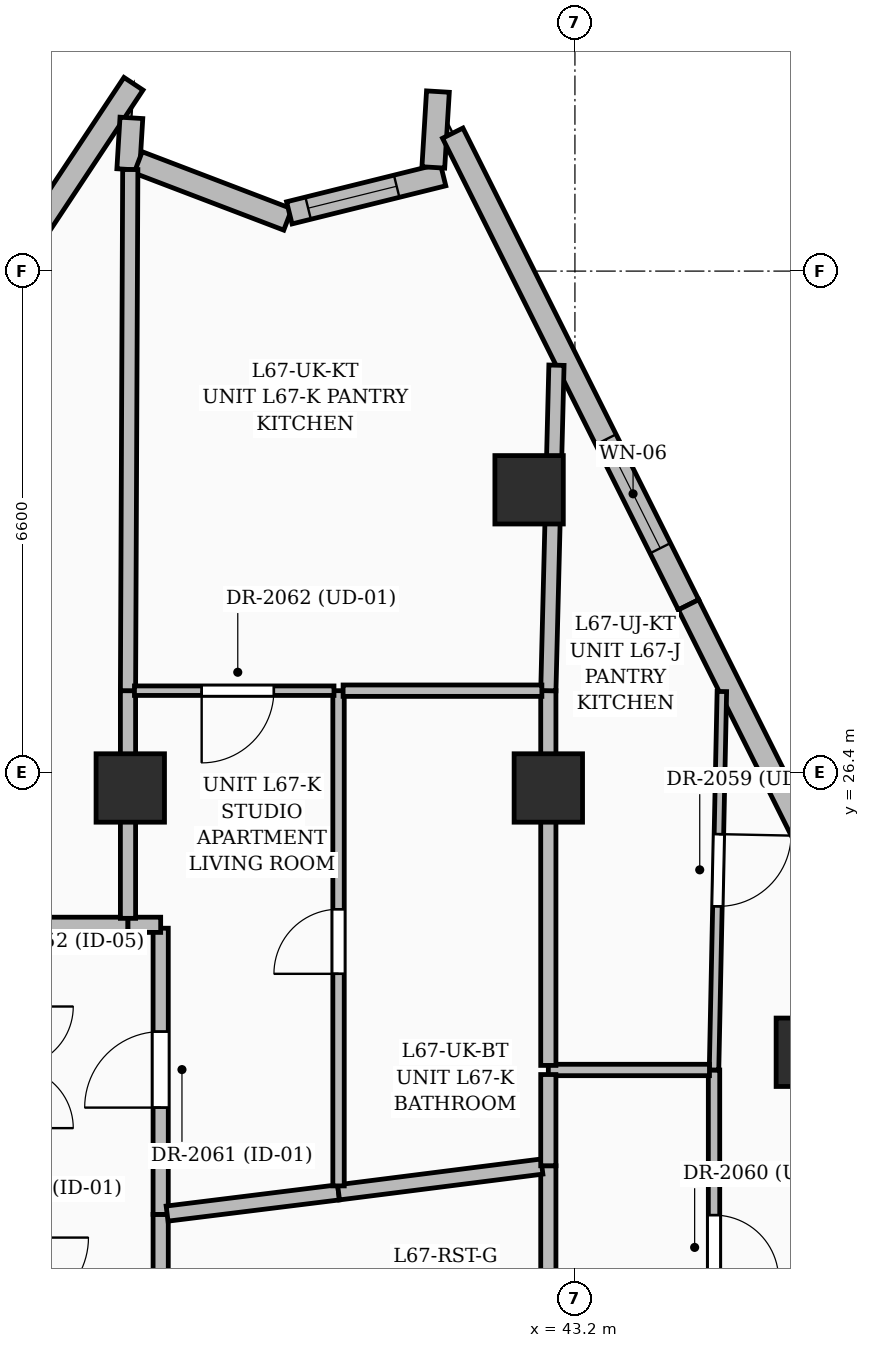
"""IFC4 building model, lengths in metres.
Left out: names, types, materials, properties, quantities, classifications, styles, units other than length and angle.
Written with IfcOpenShell. Run it as: python <this file> out.ifc"""

import sys

from ifc_helpers import new_model, si_unit, direction, frame, frame_2d, origin, origin_2d, place, context, subcontext, project, spatial, rectangle, extrude, element, fill, save


model = new_model("IFC4")
c1 = context("Model", 3, precision=1e-05, world=origin(), true_north=direction((0.0, 1.0)))
c2 = subcontext(c1, "Body", "Model", "MODEL_VIEW")
j1 = project(units=[si_unit("LENGTHUNIT", "METRE"), si_unit("PLANEANGLEUNIT", "RADIAN")], contexts=[c1])
p1 = place(None, origin())
s1 = spatial("IfcSite", under=j1, at=p1, CompositionType="ELEMENT")
p2 = place(p1, origin())
s2 = spatial("IfcBuilding", under=s1, at=p2, CompositionType="ELEMENT")
p3 = place(p2, frame((0.0, 0.0, 259.5)))
s3 = spatial("IfcBuildingStorey", under=s2, at=p3, CompositionType="ELEMENT", Elevation=259.5)
for number, where, z_axis, x_axis in (
    (1, (42.85, 26.2, 0.0), (0.0, 0.0, 1.0), (1.0, 0.0, 0.0)),
    (2, (37.35, 26.2, 0.0), (0.0, 0.0, 1.0), (1.0, 0.0, 0.0)),
    (3, (46.297, 22.723, 0.0), (0.0, 0.0, 1.0), (1.0, 0.0, 0.0)),
    (4, (42.597, 30.123, 0.0), (0.0, 0.0, 1.0), (1.0, 0.0, 0.0)),
):
    element("IfcColumn", number, at=place(p3, frame(where, z_axis=z_axis, x_axis=x_axis)), inside=s3, PredefinedType="COLUMN", context=c2, shape_type="SweptSolid", body=[
        extrude(rectangle(XDim=0.9, YDim=0.9, at=origin_2d()), origin(), (0.0, 0.0, 1.0), 3.75),
    ])
p4 = place(p3, frame((32.896, 28.675, 0.0), z_axis=(0.0, 0.0, 1.0), x_axis=(0.552110297452, 0.83377108336, 0.0)))
e5 = element("IfcWall", 5, at=p4, inside=s3, PredefinedType="SOLIDWALL", context=c2, shape_type="SweptSolid", body=[
    extrude(rectangle(XDim=8.144, YDim=0.3, at=frame_2d((4.072, 0.0))), origin(), (0.0, 0.0, 1.0), 3.5),
])
p5 = place(p4, frame((2.9, 0.0, 0.6)))
e6 = element("IfcOpeningElement", 6, at=p5, cuts=e5, PredefinedType="OPENING", context=c2, shape_type="SweptSolid", body=[
    extrude(rectangle(XDim=1.5, YDim=2.1, at=frame_2d((0.75, 1.05))), frame((0.0, 0.16, 0.0), z_axis=(0.0, -1.0, 0.0), x_axis=(1.0, 0.0, 0.0)), (0.0, 0.0, 1.0), 0.32),
])
p6 = place(p3, frame((37.365, 35.016, 0.0), z_axis=(0.0, 0.0, 1.0), x_axis=(-0.060701101821, -0.998155987929, 0.0)))
e7 = element("IfcWall", 7, at=p6, inside=s3, PredefinedType="SOLIDWALL", context=c2, shape_type="SweptSolid", body=[
    extrude(rectangle(XDim=0.68, YDim=0.3, at=frame_2d((0.34, 0.0))), origin(), (0.0, 0.0, 1.0), 3.5),
])
p7 = place(p3, frame((37.454, 34.431, 0.0), z_axis=(0.0, 0.0, 1.0), x_axis=(0.934285742141, -0.356525107155, 0.0)))
e8 = element("IfcWall", 8, at=p7, inside=s3, PredefinedType="SOLIDWALL", context=c2, shape_type="SweptSolid", body=[
    extrude(rectangle(XDim=2.108, YDim=0.3, at=frame_2d((1.054, 0.0))), origin(), (0.0, 0.0, 1.0), 3.5),
])
p8 = place(p3, frame((39.442, 33.766, 0.0), z_axis=(0.0, 0.0, 1.0), x_axis=(0.970636719037, 0.240550118805, 0.0)))
e9 = element("IfcWall", 9, at=p8, inside=s3, PredefinedType="SOLIDWALL", context=c2, shape_type="SweptSolid", body=[
    extrude(rectangle(XDim=2.084, YDim=0.3, at=frame_2d((1.042, 0.0))), origin(), (0.0, 0.0, 1.0), 3.5),
])
p9 = place(p8, frame((0.255, 0.0, 0.8)))
e10 = element("IfcOpeningElement", 10, at=p9, cuts=e9, PredefinedType="OPENING", context=c2, shape_type="SweptSolid", body=[
    extrude(rectangle(XDim=1.2, YDim=1.8, at=frame_2d((0.6, 0.9))), frame((0.0, 0.16, 0.0), z_axis=(0.0, -1.0, 0.0), x_axis=(1.0, 0.0, 0.0)), (0.0, 0.0, 1.0), 0.32),
])
p10 = place(p3, frame((41.337, 34.364, 0.0), z_axis=(0.0, 0.0, 1.0), x_axis=(0.060554036278, 0.998164920587, 0.0)))
e11 = element("IfcWall", 11, at=p10, inside=s3, PredefinedType="SOLIDWALL", context=c2, shape_type="SweptSolid", body=[
    extrude(rectangle(XDim=1.0, YDim=0.3, at=frame_2d((0.5, 0.0))), origin(), (0.0, 0.0, 1.0), 3.5),
])
p11 = place(p3, frame((41.593, 34.815, 0.0), z_axis=(0.0, 0.0, 1.0), x_axis=(0.447199517072, -0.894434230076, 0.0)))
e12 = element("IfcWall", 12, at=p11, inside=s3, PredefinedType="SOLIDWALL", context=c2, shape_type="SweptSolid", body=[
    extrude(rectangle(XDim=6.937, YDim=0.3, at=frame_2d((3.468, 0.0))), origin(), (0.0, 0.0, 1.0), 3.5),
])
p12 = place(p11, frame((4.505, 0.0, 0.55)))
e13 = element("IfcOpeningElement", 13, at=p12, cuts=e12, PredefinedType="OPENING", context=c2, shape_type="SweptSolid", body=[
    extrude(rectangle(XDim=1.6, YDim=2.2, at=frame_2d((0.8, 1.1))), frame((0.0, 0.16, 0.0), z_axis=(0.0, -1.0, 0.0), x_axis=(1.0, 0.0, 0.0)), (0.0, 0.0, 1.0), 0.32),
])
p13 = place(p3, frame((44.695, 28.611, 0.0), z_axis=(0.0, 0.0, 1.0), x_axis=(0.447161731119, -0.894453121311, 0.0)))
e14 = element("IfcWall", 14, at=p13, inside=s3, PredefinedType="SOLIDWALL", context=c2, shape_type="SweptSolid", body=[
    extrude(rectangle(XDim=7.532, YDim=0.3, at=frame_2d((3.766, 0.0))), origin(), (0.0, 0.0, 1.0), 3.5),
])
p14 = place(p13, frame((3.775, 0.0, 0.6)))
e15 = element("IfcOpeningElement", 15, at=p14, cuts=e14, PredefinedType="OPENING", context=c2, shape_type="SweptSolid", body=[
    extrude(rectangle(XDim=1.5, YDim=2.1, at=frame_2d((0.75, 1.05))), frame((0.0, 0.16, 0.0), z_axis=(0.0, -1.0, 0.0), x_axis=(1.0, 0.0, 0.0)), (0.0, 0.0, 1.0), 0.32),
])
p15 = place(p3, frame((37.75, 17.435, 0.0), z_axis=(0.0, 0.0, 1.0), x_axis=(0.0, 1.0, 0.0)))
e16 = element("IfcWall", 16, at=p15, inside=s3, PredefinedType="PARTITIONING", context=c2, shape_type="SweptSolid", body=[
    extrude(rectangle(XDim=3.155, YDim=0.2, at=frame_2d((1.578, 0.0))), origin(), (0.0, 0.0, 1.0), 3.5),
])
p16 = place(p3, frame((37.32, 24.4, 0.0), z_axis=(0.0, 0.0, 1.0), x_axis=(-1.0, 0.0, 0.0)))
e17 = element("IfcWall", 17, at=p16, inside=s3, PredefinedType="PARTITIONING", context=c2, shape_type="SweptSolid", body=[
    extrude(rectangle(XDim=1.52, YDim=0.2, at=frame_2d((0.76, 0.0))), origin(), (0.0, 0.0, 1.0), 2.685),
])
p17 = place(p3, frame((37.75, 20.59, 0.0), z_axis=(0.0, 0.0, 1.0), x_axis=(0.0, 1.0, 0.0)))
e18 = element("IfcWall", 18, at=p17, inside=s3, PredefinedType="PARTITIONING", context=c2, shape_type="SweptSolid", body=[
    extrude(rectangle(XDim=3.765, YDim=0.2, at=frame_2d((1.882, 0.0))), origin(), (0.0, 0.0, 1.0), 3.5),
])
p18 = place(p17, frame((1.405, 0.0, 0.0)))
e19 = element("IfcOpeningElement", 19, at=p18, cuts=e18, PredefinedType="OPENING", context=c2, shape_type="SweptSolid", body=[
    extrude(rectangle(XDim=1.0, YDim=2.2, at=frame_2d((0.5, 1.1))), frame((0.0, 0.11, 0.0), z_axis=(0.0, -1.0, 0.0), x_axis=(1.0, 0.0, 0.0)), (0.0, 0.0, 1.0), 0.22),
])
p19 = place(p3, frame((37.75, 24.4, 0.0), z_axis=(0.0, 0.0, 1.0), x_axis=(-1.0, 0.0, 0.0)))
e20 = element("IfcWall", 20, at=p19, inside=s3, PredefinedType="PARTITIONING", context=c2, shape_type="SweptSolid", body=[
    extrude(rectangle(XDim=0.43, YDim=0.2, at=frame_2d((0.215, 0.0))), origin(), (0.0, 0.0, 1.0), 3.5),
])
p20 = place(p3, frame((42.85, 17.435, 0.0), z_axis=(0.0, 0.0, 1.0), x_axis=(0.0, 1.0, 0.0)))
e21 = element("IfcWall", 21, at=p20, inside=s3, PredefinedType="PARTITIONING", context=c2, shape_type="SweptSolid", body=[
    extrude(rectangle(XDim=3.795, YDim=0.2, at=frame_2d((1.897, 0.0))), origin(), (0.0, 0.0, 1.0), 3.5),
])
p21 = place(p3, frame((40.09, 20.88, 0.0), z_axis=(0.0, 0.0, 1.0), x_axis=(-0.992420982951, -0.122884468503, 0.0)))
e22 = element("IfcWall", 22, at=p21, inside=s3, PredefinedType="PARTITIONING", context=c2, shape_type="SweptSolid", body=[
    extrude(rectangle(XDim=2.273, YDim=0.2, at=frame_2d((1.136, 0.0))), origin(), (0.0, 0.0, 1.0), 3.5),
])
p22 = place(p3, frame((42.766, 21.219, 0.0), z_axis=(0.0, 0.0, 1.0), x_axis=(-0.992052034516, -0.12582829893, 0.0)))
e23 = element("IfcWall", 23, at=p22, inside=s3, PredefinedType="PARTITIONING", context=c2, shape_type="SweptSolid", body=[
    extrude(rectangle(XDim=2.697, YDim=0.2, at=frame_2d((1.349, 0.0))), origin(), (0.0, 0.0, 1.0), 3.5),
])
p23 = place(p3, frame((37.32, 24.485, 0.0), z_axis=(0.0, 0.0, 1.0), x_axis=(0.0, 1.0, 0.0)))
e24 = element("IfcWall", 24, at=p23, inside=s3, PredefinedType="PARTITIONING", context=c2, shape_type="SweptSolid", body=[
    extrude(rectangle(XDim=2.995, YDim=0.2, at=frame_2d((1.498, 0.0))), origin(), (0.0, 0.0, 1.0), 2.685),
])
p24 = place(p3, frame((37.32, 27.48, 0.0), z_axis=(0.0, 0.0, 1.0), x_axis=(0.004379987898, 0.999990407807, 0.0)))
e25 = element("IfcWall", 25, at=p24, inside=s3, PredefinedType="PARTITIONING", context=c2, shape_type="SweptSolid", body=[
    extrude(rectangle(XDim=6.856, YDim=0.2, at=frame_2d((3.428, 0.0))), origin(), (0.0, 0.0, 1.0), 2.82),
])
p25 = place(p3, frame((45.03, 22.49, 0.0), z_axis=(0.0, 0.0, 1.0), x_axis=(0.0, -1.0, 0.0)))
e26 = element("IfcWall", 26, at=p25, inside=s3, PredefinedType="PARTITIONING", context=c2, shape_type="SweptSolid", body=[
    extrude(rectangle(XDim=5.055, YDim=0.15, at=frame_2d((2.527, 0.0))), origin(), (0.0, 0.0, 1.0), 2.685),
])
p26 = place(p25, frame((1.909, 0.0, 0.0)))
e27 = element("IfcOpeningElement", 27, at=p26, cuts=e26, PredefinedType="OPENING", context=c2, shape_type="SweptSolid", body=[
    extrude(rectangle(XDim=0.85, YDim=2.1, at=frame_2d((0.425, 1.05))), frame((0.0, 0.085, 0.0), z_axis=(0.0, -1.0, 0.0), x_axis=(1.0, 0.0, 0.0)), (0.0, 0.0, 1.0), 0.17),
])
p27 = place(p3, frame((45.133, 27.469, 0.0), z_axis=(0.0, 0.0, 1.0), x_axis=(-0.020687931957, -0.999785981834, 0.0)))
e28 = element("IfcWall", 28, at=p27, inside=s3, PredefinedType="PARTITIONING", context=c2, shape_type="SweptSolid", body=[
    extrude(rectangle(XDim=4.98, YDim=0.125, at=frame_2d((2.49, 0.0))), origin(), (0.0, 0.0, 1.0), 2.82),
])
p28 = place(p27, frame((1.876, 0.0, 0.0)))
e29 = element("IfcOpeningElement", 29, at=p28, cuts=e28, PredefinedType="OPENING", context=c2, shape_type="SweptSolid", body=[
    extrude(rectangle(XDim=0.95, YDim=2.2, at=frame_2d((0.475, 1.1))), frame((0.0, 0.072, 0.0), z_axis=(0.0, -1.0, 0.0), x_axis=(1.0, 0.0, 0.0)), (0.0, 0.0, 1.0), 0.145),
])
p29 = place(p3, frame((44.97, 22.49, 0.0), z_axis=(0.0, 0.0, 1.0), x_axis=(-1.0, 0.0, 0.0)))
e30 = element("IfcWall", 30, at=p29, inside=s3, PredefinedType="PARTITIONING", context=c2, shape_type="SweptSolid", body=[
    extrude(rectangle(XDim=2.12, YDim=0.15, at=frame_2d((1.06, 0.0))), origin(), (0.0, 0.0, 1.0), 2.685),
])
p30 = place(p3, frame((42.85, 22.43, 0.0), z_axis=(0.0, 0.0, 1.0), x_axis=(0.0, -1.0, 0.0)))
e31 = element("IfcWall", 31, at=p30, inside=s3, PredefinedType="PARTITIONING", context=c2, shape_type="SweptSolid", body=[
    extrude(rectangle(XDim=1.2, YDim=0.2, at=frame_2d((0.6, 0.0))), origin(), (0.0, 0.0, 1.0), 3.5),
])
p31 = place(p3, frame((42.85, 27.48, 0.0), z_axis=(0.0, 0.0, 1.0), x_axis=(0.0, -1.0, 0.0)))
e32 = element("IfcWall", 32, at=p31, inside=s3, PredefinedType="PARTITIONING", context=c2, shape_type="SweptSolid", body=[
    extrude(rectangle(XDim=4.93, YDim=0.2, at=frame_2d((2.465, 0.0))), origin(), (0.0, 0.0, 1.0), 2.685),
])
p32 = place(p3, frame((42.957, 31.762, 0.0), z_axis=(0.0, 0.0, 1.0), x_axis=(-0.024965134001, -0.999688322471, 0.0)))
e33 = element("IfcWall", 33, at=p32, inside=s3, PredefinedType="PARTITIONING", context=c2, shape_type="SweptSolid", body=[
    extrude(rectangle(XDim=4.283, YDim=0.2, at=frame_2d((2.142, 0.0))), origin(), (0.0, 0.0, 1.0), 2.764),
])
p33 = place(p3, frame((40.09, 20.965, 0.0), z_axis=(0.0, 0.0, 1.0), x_axis=(0.0, 1.0, 0.0)))
e34 = element("IfcWall", 34, at=p33, inside=s3, PredefinedType="PARTITIONING", context=c2, shape_type="SweptSolid", body=[
    extrude(rectangle(XDim=6.515, YDim=0.15, at=frame_2d((3.257, 0.0))), origin(), (0.0, 0.0, 1.0), 2.685),
])
p34 = place(p33, frame((2.79, 0.0, 0.0)))
e35 = element("IfcOpeningElement", 35, at=p34, cuts=e34, PredefinedType="OPENING", context=c2, shape_type="SweptSolid", body=[
    extrude(rectangle(XDim=0.85, YDim=2.1, at=frame_2d((0.425, 1.05))), frame((0.0, 0.085, 0.0), z_axis=(0.0, -1.0, 0.0), x_axis=(1.0, 0.0, 0.0)), (0.0, 0.0, 1.0), 0.17),
])
p35 = place(p3, frame((40.03, 27.48, 0.0), z_axis=(0.0, 0.0, 1.0), x_axis=(-1.0, 0.0, 0.0)))
e36 = element("IfcWall", 36, at=p35, inside=s3, PredefinedType="PARTITIONING", context=c2, shape_type="SweptSolid", body=[
    extrude(rectangle(XDim=2.625, YDim=0.125, at=frame_2d((1.312, 0.0))), origin(), (0.0, 0.0, 1.0), 3.061),
])
p36 = place(p35, frame((0.791, 0.0, 0.0)))
e37 = element("IfcOpeningElement", 37, at=p36, cuts=e36, PredefinedType="OPENING", context=c2, shape_type="SweptSolid", body=[
    extrude(rectangle(XDim=0.95, YDim=2.2, at=frame_2d((0.475, 1.1))), frame((0.0, 0.072, 0.0), z_axis=(0.0, -1.0, 0.0), x_axis=(1.0, 0.0, 0.0)), (0.0, 0.0, 1.0), 0.145),
])
p37 = place(p3, frame((42.765, 27.48, 0.0), z_axis=(0.0, 0.0, 1.0), x_axis=(-1.0, 0.0, 0.0)))
e38 = element("IfcWall", 38, at=p37, inside=s3, PredefinedType="PARTITIONING", context=c2, shape_type="SweptSolid", body=[
    extrude(rectangle(XDim=2.615, YDim=0.15, at=frame_2d((1.308, 0.0))), origin(), (0.0, 0.0, 1.0), 2.764),
])
p38 = place(p9, origin())
e39 = element("IfcWindow", 39, at=p38, inside=s3, PartitioningType="SINGLE_PANEL", PredefinedType="WINDOW", context=c2, shape_type="SweptSolid", body=[
    extrude(rectangle(XDim=1.2, YDim=1.8, at=frame_2d((0.6, 0.9))), frame((0.0, 0.03, 0.0), z_axis=(0.0, -1.0, 0.0), x_axis=(1.0, 0.0, 0.0)), (0.0, 0.0, 1.0), 0.06),
])
fill(e10, e39)
p39 = place(p12, origin())
e40 = element("IfcWindow", 40, at=p39, inside=s3, PartitioningType="SINGLE_PANEL", PredefinedType="WINDOW", context=c2, shape_type="SweptSolid", body=[
    extrude(rectangle(XDim=1.6, YDim=2.2, at=frame_2d((0.8, 1.1))), frame((0.0, 0.03, 0.0), z_axis=(0.0, -1.0, 0.0), x_axis=(1.0, 0.0, 0.0)), (0.0, 0.0, 1.0), 0.06),
])
fill(e13, e40)
p40 = place(p28, origin())
e41 = element("IfcDoor", 41, at=p40, inside=s3, OperationType="SINGLE_SWING_LEFT", PredefinedType="DOOR", context=c2, shape_type="SweptSolid", body=[
    extrude(rectangle(XDim=0.95, YDim=2.2, at=frame_2d((0.475, 1.1))), frame((0.0, 0.025, 0.0), z_axis=(0.0, -1.0, 0.0), x_axis=(1.0, 0.0, 0.0)), (0.0, 0.0, 1.0), 0.05),
])
fill(e29, e41)
p41 = place(p26, origin())
e42 = element("IfcDoor", 42, at=p41, inside=s3, OperationType="SINGLE_SWING_RIGHT", PredefinedType="DOOR", context=c2, shape_type="SweptSolid", body=[
    extrude(rectangle(XDim=0.85, YDim=2.1, at=frame_2d((0.425, 1.05))), frame((0.0, 0.025, 0.0), z_axis=(0.0, -1.0, 0.0), x_axis=(1.0, 0.0, 0.0)), (0.0, 0.0, 1.0), 0.05),
])
fill(e27, e42)
p42 = place(p18, origin())
e43 = element("IfcDoor", 43, at=p42, inside=s3, OperationType="SINGLE_SWING_LEFT", PredefinedType="DOOR", context=c2, shape_type="SweptSolid", body=[
    extrude(rectangle(XDim=1.0, YDim=2.2, at=frame_2d((0.5, 1.1))), frame((0.0, 0.025, 0.0), z_axis=(0.0, -1.0, 0.0), x_axis=(1.0, 0.0, 0.0)), (0.0, 0.0, 1.0), 0.05),
])
fill(e19, e43)
p43 = place(p36, origin())
e44 = element("IfcDoor", 44, at=p43, inside=s3, OperationType="SINGLE_SWING_RIGHT", PredefinedType="DOOR", context=c2, shape_type="SweptSolid", body=[
    extrude(rectangle(XDim=0.95, YDim=2.2, at=frame_2d((0.475, 1.1))), frame((0.0, 0.025, 0.0), z_axis=(0.0, -1.0, 0.0), x_axis=(1.0, 0.0, 0.0)), (0.0, 0.0, 1.0), 0.05),
])
fill(e37, e44)
p44 = place(p34, origin())
e45 = element("IfcDoor", 45, at=p44, inside=s3, OperationType="SINGLE_SWING_LEFT", PredefinedType="DOOR", context=c2, shape_type="SweptSolid", body=[
    extrude(rectangle(XDim=0.85, YDim=2.1, at=frame_2d((0.425, 1.05))), frame((0.0, 0.025, 0.0), z_axis=(0.0, -1.0, 0.0), x_axis=(1.0, 0.0, 0.0)), (0.0, 0.0, 1.0), 0.05),
])
fill(e35, e45)
save(model, sys.argv[1])
